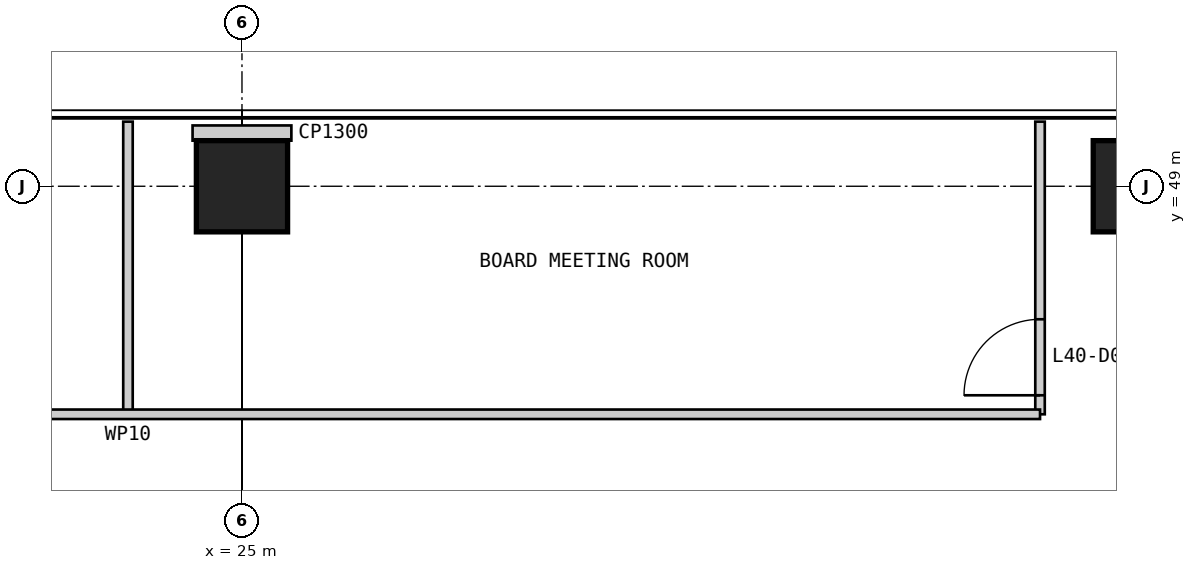
"""IFC4 building model, lengths in metres.
Left out: names, types, materials, properties, quantities, classifications, styles, units other than length and angle.
Written with IfcOpenShell. Run it as: python <this file> out.ifc"""

import sys

from ifc_helpers import new_model, si_unit, direction, frame, frame_2d, origin, origin_2d, place, context, subcontext, project, spatial, rectangle, extrude, element, fill, save


model = new_model("IFC4")
c1 = context("Model", 3, precision=1e-05, world=origin(), true_north=direction((0.0, 1.0)))
c2 = subcontext(c1, "Body", "Model", "MODEL_VIEW")
j1 = project(units=[si_unit("LENGTHUNIT", "METRE"), si_unit("PLANEANGLEUNIT", "RADIAN")], contexts=[c1])
p1 = place(None, origin())
s1 = spatial("IfcSite", under=j1, at=p1, CompositionType="ELEMENT")
p2 = place(p1, origin())
s2 = spatial("IfcBuilding", under=s1, at=p2, CompositionType="ELEMENT")
p3 = place(p2, frame((0.0, 0.0, 173.8)))
s3 = spatial("IfcBuildingStorey", under=s2, at=p3, CompositionType="ELEMENT", Elevation=173.8)
p4 = place(p3, frame((37.0, 49.0, 0.0), z_axis=(0.0, 0.0, 1.0), x_axis=(1.0, 0.0, 0.0)))
e1 = element("IfcColumn", 1, at=p4, inside=s3, PredefinedType="COLUMN", context=c2, shape_type="SweptSolid", body=[
    extrude(rectangle(XDim=1.6, YDim=1.2, at=origin_2d()), origin(), (0.0, 0.0, 1.0), 4.0),
])
p5 = place(p3, frame((25.0, 49.0, 0.0), z_axis=(0.0, 0.0, 1.0), x_axis=(1.0, 0.0, 0.0)))
e2 = element("IfcColumn", 2, at=p5, inside=s3, PredefinedType="COLUMN", context=c2, shape_type="SweptSolid", body=[
    extrude(rectangle(XDim=1.2, YDim=1.2, at=origin_2d()), origin(), (0.0, 0.0, 1.0), 4.0),
])
p6 = place(p3, frame((35.5, 49.85, 0.0), z_axis=(0.0, 0.0, 1.0), x_axis=(0.0, -1.0, 0.0)))
e3 = element("IfcWall", 3, at=p6, inside=s3, PredefinedType="PARTITIONING", context=c2, shape_type="SweptSolid", body=[
    extrude(rectangle(XDim=3.85, YDim=0.125, at=frame_2d((1.925, 0.0))), origin(), (0.0, 0.0, 1.0), 3.85),
])
p7 = place(p6, frame((2.6, 0.0, 0.0)))
e4 = element("IfcOpeningElement", 4, at=p7, cuts=e3, PredefinedType="OPENING", context=c2, shape_type="SweptSolid", body=[
    extrude(rectangle(XDim=1.0, YDim=2.2, at=frame_2d((0.5, 1.1))), frame((0.0, 0.073, 0.0), z_axis=(0.0, -1.0, 0.0), x_axis=(1.0, 0.0, 0.0)), (0.0, 0.0, 1.0), 0.145),
])
p8 = place(p3, frame((23.5, 49.85, 0.0), z_axis=(0.0, 0.0, 1.0), x_axis=(0.0, -1.0, 0.0)))
e5 = element("IfcWall", 5, at=p8, inside=s3, PredefinedType="PARTITIONING", context=c2, shape_type="SweptSolid", body=[
    extrude(rectangle(XDim=3.85, YDim=0.125, at=frame_2d((1.925, 0.0))), origin(), (0.0, 0.0, 1.0), 3.85),
])
p9 = place(p3, frame((35.5, 46.0, 0.0), z_axis=(0.0, 0.0, 1.0), x_axis=(-1.0, 0.0, 0.0)))
e6 = element("IfcWall", 6, at=p9, inside=s3, PredefinedType="PARTITIONING", context=c2, shape_type="SweptSolid", body=[
    extrude(rectangle(XDim=24.0, YDim=0.125, at=frame_2d((12.0, 0.0))), origin(), (0.0, 0.0, 1.0), 3.85),
])
p10 = place(p9, frame((16.05, 0.0, 0.0)))
e7 = element("IfcOpeningElement", 7, at=p10, cuts=e6, PredefinedType="OPENING", context=c2, shape_type="SweptSolid", body=[
    extrude(rectangle(XDim=0.9, YDim=2.2, at=frame_2d((0.45, 1.1))), frame((0.0, 0.073, 0.0), z_axis=(0.0, -1.0, 0.0), x_axis=(1.0, 0.0, 0.0)), (0.0, 0.0, 1.0), 0.145),
])
p11 = place(p9, frame((19.05, 0.0, 0.0)))
e8 = element("IfcOpeningElement", 8, at=p11, cuts=e6, PredefinedType="OPENING", context=c2, shape_type="SweptSolid", body=[
    extrude(rectangle(XDim=0.9, YDim=2.2, at=frame_2d((0.45, 1.1))), frame((0.0, 0.073, 0.0), z_axis=(0.0, -1.0, 0.0), x_axis=(1.0, 0.0, 0.0)), (0.0, 0.0, 1.0), 0.145),
])
p12 = place(p3, frame((25.0, 49.8, 0.0), z_axis=(0.0, 0.0, 1.0), x_axis=(0.0, -1.0, 0.0)))
e9 = element("IfcWall", 9, at=p12, inside=s3, PredefinedType="PARTITIONING", context=c2, shape_type="SweptSolid", body=[
    extrude(rectangle(XDim=0.2, YDim=1.3, at=frame_2d((0.1, 0.0))), origin(), (0.0, 0.0, 1.0), 3.85),
])
p13 = place(p7, frame((1.0, 0.0, 0.0), z_axis=(0.0, 0.0, 1.0), x_axis=(-1.0, 0.0, 0.0)))
e10 = element("IfcDoor", 10, at=p13, inside=s3, OperationType="SINGLE_SWING_LEFT", PredefinedType="DOOR", context=c2, shape_type="SweptSolid", body=[
    extrude(rectangle(XDim=1.0, YDim=2.2, at=frame_2d((0.5, 1.1))), frame((0.0, 0.025, 0.0), z_axis=(0.0, -1.0, 0.0), x_axis=(1.0, 0.0, 0.0)), (0.0, 0.0, 1.0), 0.05),
])
fill(e4, e10)
save(model, sys.argv[1])
